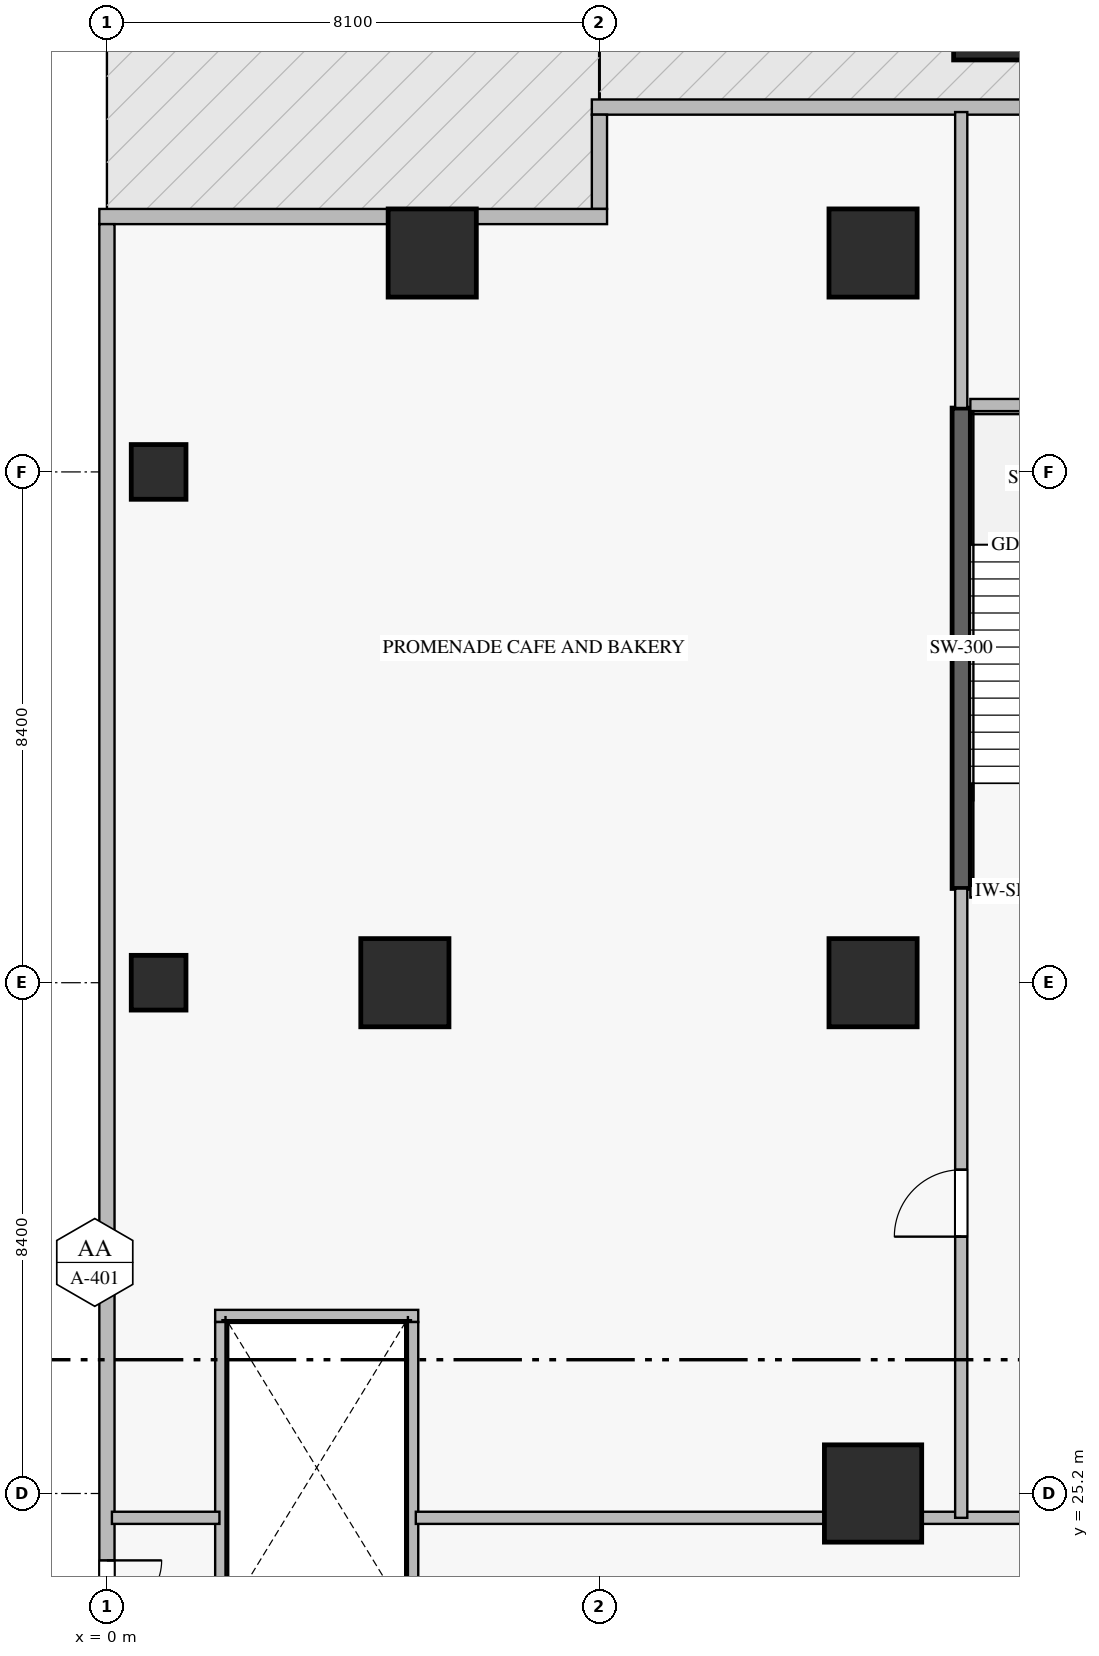
"""IFC4 building model, lengths in metres.
Left out: names, types, materials, properties, quantities, classifications, styles, units other than length and angle.
Written with IfcOpenShell. Run it as: python <this file> out.ifc"""

import sys

from ifc_helpers import new_model, si_unit, direction, frame, frame_2d, origin, origin_2d, place, context, subcontext, project, spatial, rectangle, extrude, source, transform, mapped, element, fill, save


model = new_model("IFC4")
c1 = context("Model", 3, precision=1e-05, world=origin(), true_north=direction((0.0, 1.0)))
c2 = subcontext(c1, "Body", "Model", "MODEL_VIEW")
j1 = project(units=[si_unit("LENGTHUNIT", "METRE"), si_unit("PLANEANGLEUNIT", "RADIAN")], contexts=[c1])
p1 = place(None, origin())
s1 = spatial("IfcSite", under=j1, at=p1, CompositionType="ELEMENT")
p2 = place(p1, origin())
s2 = spatial("IfcBuilding", under=s1, at=p2, CompositionType="ELEMENT")
p3 = place(p2, origin())
s3 = spatial("IfcBuildingStorey", under=s2, at=p3, CompositionType="ELEMENT", Elevation=0.0)
m1 = source(origin(), c2, "Body", "SweptSolid", [
    extrude(rectangle(XDim=0.9, YDim=0.9, at=origin_2d()), origin(), (0.0, 0.0, 1.0), 5.5),
])
for number, where, z_axis, x_axis in (
    (1, (0.85, 33.6, -0.38), (0.0, 0.0, 1.0), (1.0, 0.0, 0.0)),
    (2, (0.85, 42.0, -0.38), (0.0, 0.0, 1.0), (1.0, 0.0, 0.0)),
):
    element("IfcColumn", number, at=place(p3, frame(where, z_axis=z_axis, x_axis=x_axis)), inside=s3, PredefinedType="COLUMN", context=c2, shape_type="MappedRepresentation", body=[
        mapped(m1, transform((0.0, 0.0, 0.0), scale=1.0)),
    ])
m2 = source(origin(), c2, "Body", "SweptSolid", [
    extrude(rectangle(XDim=1.45, YDim=1.45, at=origin_2d()), origin(), (0.0, 0.0, 1.0), 5.5),
])
p4 = place(p3, frame((12.6, 45.6, -0.38), z_axis=(0.0, 0.0, 1.0), x_axis=(1.0, 0.0, 0.0)))
e3 = element("IfcColumn", 3, at=p4, inside=s3, PredefinedType="COLUMN", context=c2, shape_type="MappedRepresentation", body=[
    mapped(m2, transform((0.0, 0.0, 0.0), scale=1.0)),
])
m3 = source(origin(), c2, "Body", "SweptSolid", [
    extrude(rectangle(XDim=1.6, YDim=1.6, at=origin_2d()), origin(), (0.0, 0.0, 1.0), 5.5),
])
p5 = place(p3, frame((12.6, 25.2, -0.38), z_axis=(0.0, 0.0, 1.0), x_axis=(1.0, 0.0, 0.0)))
e4 = element("IfcColumn", 4, at=p5, inside=s3, PredefinedType="COLUMN", context=c2, shape_type="MappedRepresentation", body=[
    mapped(m3, transform((0.0, 0.0, 0.0), scale=1.0)),
])
for number, where, z_axis, x_axis in (
    (5, (12.6, 33.6, -0.38), (0.0, 0.0, 1.0), (1.0, 0.0, 0.0)),
    (6, (14.65, 49.5, -0.38), (0.0, 0.0, 1.0), (1.0, 0.0, 0.0)),
    (7, (4.9, 33.6, -0.38), (0.0, 0.0, 1.0), (1.0, 0.0, 0.0)),
    (8, (5.35, 45.6, -0.38), (0.0, 0.0, 1.0), (1.0, 0.0, 0.0)),
):
    element("IfcColumn", number, at=place(p3, frame(where, z_axis=z_axis, x_axis=x_axis)), inside=s3, PredefinedType="COLUMN", context=c2, shape_type="MappedRepresentation", body=[
        mapped(m2, transform((0.0, 0.0, 0.0), scale=1.0)),
    ])
p6 = place(p3, frame((56.825, 48.0, 0.0), z_axis=(0.0, 0.0, 1.0), x_axis=(-1.0, 0.0, 0.0)))
e9 = element("IfcWall", 9, at=p6, inside=s3, PredefinedType="ELEMENTEDWALL", context=c2, shape_type="SweptSolid", body=[
    extrude(rectangle(XDim=48.85, YDim=0.25, at=frame_2d((24.425, 0.0))), origin(), (0.0, 0.0, 1.0), 5.105),
])
p7 = place(p6, frame((7.825, 0.0, 0.0)))
e10 = element("IfcOpeningElement", 10, at=p7, cuts=e9, PredefinedType="OPENING", context=c2, shape_type="SweptSolid", body=[
    extrude(rectangle(XDim=4.2, YDim=3.1, at=frame_2d((2.1, 1.55))), frame((0.0, 0.135, 0.0), z_axis=(0.0, -1.0, 0.0), x_axis=(1.0, 0.0, 0.0)), (0.0, 0.0, 1.0), 0.27),
])
p8 = place(p6, frame((14.725, 0.0, 0.0)))
e11 = element("IfcOpeningElement", 11, at=p8, cuts=e9, PredefinedType="OPENING", context=c2, shape_type="SweptSolid", body=[
    extrude(rectangle(XDim=3.8, YDim=3.4, at=frame_2d((1.9, 1.7))), frame((0.0, 0.135, 0.0), z_axis=(0.0, -1.0, 0.0), x_axis=(1.0, 0.0, 0.0)), (0.0, 0.0, 1.0), 0.27),
])
p9 = place(p6, frame((38.825, 0.0, 0.0)))
e12 = element("IfcOpeningElement", 12, at=p9, cuts=e9, PredefinedType="OPENING", context=c2, shape_type="SweptSolid", body=[
    extrude(rectangle(XDim=1.8, YDim=2.3, at=frame_2d((0.9, 1.15))), frame((0.0, 0.135, 0.0), z_axis=(0.0, -1.0, 0.0), x_axis=(1.0, 0.0, 0.0)), (0.0, 0.0, 1.0), 0.27),
])
p10 = place(p6, frame((2.425, 0.0, 0.0)))
e13 = element("IfcOpeningElement", 13, at=p10, cuts=e9, PredefinedType="OPENING", context=c2, shape_type="SweptSolid", body=[
    extrude(rectangle(XDim=1.8, YDim=2.3, at=frame_2d((0.9, 1.15))), frame((0.0, 0.135, 0.0), z_axis=(0.0, -1.0, 0.0), x_axis=(1.0, 0.0, 0.0)), (0.0, 0.0, 1.0), 0.27),
])
p11 = place(p3, frame((8.1, 47.875, 0.0), z_axis=(0.0, 0.0, 1.0), x_axis=(0.0, -1.0, 0.0)))
e14 = element("IfcWall", 14, at=p11, inside=s3, PredefinedType="ELEMENTEDWALL", context=c2, shape_type="SweptSolid", body=[
    extrude(rectangle(XDim=1.55, YDim=0.25, at=frame_2d((0.775, 0.0))), origin(), (0.0, 0.0, 1.0), 5.105),
])
p12 = place(p3, frame((8.225, 46.2, 0.0), z_axis=(0.0, 0.0, 1.0), x_axis=(-1.0, 0.0, 0.0)))
e15 = element("IfcWall", 15, at=p12, inside=s3, PredefinedType="ELEMENTEDWALL", context=c2, shape_type="SweptSolid", body=[
    extrude(rectangle(XDim=8.35, YDim=0.25, at=frame_2d((4.175, 0.0))), origin(), (0.0, 0.0, 1.0), 5.105),
])
p13 = place(p3, frame((0.0, 46.075, 0.0), z_axis=(0.0, 0.0, 1.0), x_axis=(0.0, -1.0, 0.0)))
e16 = element("IfcWall", 16, at=p13, inside=s3, PredefinedType="ELEMENTEDWALL", context=c2, shape_type="SweptSolid", body=[
    extrude(rectangle(XDim=41.75, YDim=0.25, at=frame_2d((20.875, 0.0))), origin(), (0.0, 0.0, 1.0), 5.105),
])
p14 = place(p13, frame((21.975, 0.0, 0.0)))
e17 = element("IfcOpeningElement", 17, at=p14, cuts=e16, PredefinedType="OPENING", context=c2, shape_type="SweptSolid", body=[
    extrude(rectangle(XDim=1.8, YDim=2.3, at=frame_2d((0.9, 1.15))), frame((0.0, 0.135, 0.0), z_axis=(0.0, -1.0, 0.0), x_axis=(1.0, 0.0, 0.0)), (0.0, 0.0, 1.0), 0.27),
])
p15 = place(p13, frame((33.475, 0.0, 0.0)))
e18 = element("IfcOpeningElement", 18, at=p15, cuts=e16, PredefinedType="OPENING", context=c2, shape_type="SweptSolid", body=[
    extrude(rectangle(XDim=1.8, YDim=2.3, at=frame_2d((0.9, 1.15))), frame((0.0, 0.135, 0.0), z_axis=(0.0, -1.0, 0.0), x_axis=(1.0, 0.0, 0.0)), (0.0, 0.0, 1.0), 0.27),
])
p16 = place(p3, frame((14.05, 35.15, -0.38), z_axis=(0.0, 0.0, 1.0), x_axis=(0.0, 1.0, 0.0)))
e19 = element("IfcWall", 19, at=p16, inside=s3, PredefinedType="SHEAR", context=c2, shape_type="SweptSolid", body=[
    extrude(rectangle(XDim=7.9, YDim=0.3, at=frame_2d((3.95, 0.0))), origin(), (0.0, 0.0, 1.0), 5.498),
])
p17 = place(p3, frame((14.2, 35.1, 0.0), z_axis=(0.0, 0.0, 1.0), x_axis=(1.0, 0.0, 0.0)))
e20 = element("IfcWall", 20, at=p17, inside=s3, PredefinedType="STANDARD", context=c2, shape_type="SweptSolid", body=[
    extrude(rectangle(XDim=3.5, YDim=0.2, at=frame_2d((1.75, 0.0))), origin(), (0.0, 0.0, 1.0), 5.12),
])
p18 = place(p17, frame((1.2, 0.0, 0.0)))
e21 = element("IfcOpeningElement", 21, at=p18, cuts=e20, PredefinedType="OPENING", context=c2, shape_type="SweptSolid", body=[
    extrude(rectangle(XDim=1.1, YDim=2.15, at=frame_2d((0.55, 1.075))), frame((0.0, 0.11, 0.0), z_axis=(0.0, -1.0, 0.0), x_axis=(1.0, 0.0, 0.0)), (0.0, 0.0, 1.0), 0.22),
])
p19 = place(p3, frame((14.2, 43.1, 0.0), z_axis=(0.0, 0.0, 1.0), x_axis=(1.0, 0.0, 0.0)))
e22 = element("IfcWall", 22, at=p19, inside=s3, PredefinedType="STANDARD", context=c2, shape_type="SweptSolid", body=[
    extrude(rectangle(XDim=3.5, YDim=0.2, at=frame_2d((1.75, 0.0))), origin(), (0.0, 0.0, 1.0), 2.235),
])
p20 = place(p3, frame((1.78, 28.12, 0.0), z_axis=(0.0, 0.0, 1.0), x_axis=(1.0, 0.0, 0.0)))
e23 = element("IfcWall", 23, at=p20, inside=s3, PredefinedType="STANDARD", context=c2, shape_type="SweptSolid", body=[
    extrude(rectangle(XDim=3.34, YDim=0.2, at=frame_2d((1.67, 0.0))), origin(), (0.0, 0.0, 1.0), 5.12),
])
for number, where, z_axis, x_axis in (
    (24, (1.88, 21.78, 0.0), (0.0, 0.0, 1.0), (0.0, 1.0, 0.0)),
    (25, (5.02, 21.78, 0.0), (0.0, 0.0, 1.0), (0.0, 1.0, 0.0)),
):
    element("IfcWall", number, at=place(p3, frame(where, z_axis=z_axis, x_axis=x_axis)), inside=s3, PredefinedType="STANDARD", context=c2, shape_type="SweptSolid", body=[
        extrude(rectangle(XDim=6.24, YDim=0.2, at=frame_2d((3.12, 0.0))), origin(), (0.0, 0.0, 1.0), 5.12),
    ])
p21 = place(p3, frame((0.082, 24.8, 0.0), z_axis=(0.0, 0.0, 1.0), x_axis=(1.0, 0.0, 0.0)))
e26 = element("IfcWall", 26, at=p21, inside=s3, PredefinedType="STANDARD", context=c2, shape_type="SweptSolid", body=[
    extrude(rectangle(XDim=1.768, YDim=0.2, at=frame_2d((0.884, 0.0))), origin(), (0.0, 0.0, 1.0), 5.12),
])
p22 = place(p3, frame((5.08, 24.8, 0.0), z_axis=(0.0, 0.0, 1.0), x_axis=(1.0, 0.0, 0.0)))
e27 = element("IfcWall", 27, at=p22, inside=s3, PredefinedType="STANDARD", context=c2, shape_type="SweptSolid", body=[
    extrude(rectangle(XDim=16.42, YDim=0.2, at=frame_2d((8.21, 0.0))), origin(), (0.0, 0.0, 1.0), 5.12),
])
p23 = place(p3, frame((14.05, 24.8, 0.0), z_axis=(0.0, 0.0, 1.0), x_axis=(0.0, 1.0, 0.0)))
e28 = element("IfcWall", 28, at=p23, inside=s3, PredefinedType="STANDARD", context=c2, shape_type="SweptSolid", body=[
    extrude(rectangle(XDim=10.348, YDim=0.2, at=frame_2d((5.174, 0.0))), origin(), (0.0, 0.0, 1.0), 5.12),
])
p24 = place(p23, frame((4.624, 0.0, 0.0)))
e29 = element("IfcOpeningElement", 29, at=p24, cuts=e28, PredefinedType="OPENING", context=c2, shape_type="SweptSolid", body=[
    extrude(rectangle(XDim=1.1, YDim=2.15, at=frame_2d((0.55, 1.075))), frame((0.0, 0.11, 0.0), z_axis=(0.0, -1.0, 0.0), x_axis=(1.0, 0.0, 0.0)), (0.0, 0.0, 1.0), 0.22),
])
p25 = place(p3, frame((14.05, 43.052, 0.0), z_axis=(0.0, 0.0, 1.0), x_axis=(0.0, 1.0, 0.0)))
e30 = element("IfcWall", 30, at=p25, inside=s3, PredefinedType="STANDARD", context=c2, shape_type="SweptSolid", body=[
    extrude(rectangle(XDim=4.866, YDim=0.2, at=frame_2d((2.433, 0.0))), origin(), (0.0, 0.0, 1.0), 5.12),
])
m4 = source(origin(), c2, "Body", "SweptSolid", [
    extrude(rectangle(XDim=1.8, YDim=2.3, at=frame_2d((0.9, 1.15))), frame((0.0, 0.025, 0.0), z_axis=(0.0, -1.0, 0.0), x_axis=(1.0, 0.0, 0.0)), (0.0, 0.0, 1.0), 0.05),
])
p26 = place(p14, frame((1.8, 0.0, 0.0), z_axis=(0.0, 0.0, 1.0), x_axis=(-1.0, 0.0, 0.0)))
e31 = element("IfcDoor", 31, at=p26, inside=s3, OperationType="DOUBLE_DOOR_SINGLE_SWING", PredefinedType="DOOR", context=c2, shape_type="MappedRepresentation", body=[
    mapped(m4, transform((0.0, 0.0, 0.0), scale=1.0)),
])
fill(e17, e31)
m5 = source(origin(), c2, "Body", "SweptSolid", [
    extrude(rectangle(XDim=1.1, YDim=2.15, at=frame_2d((0.55, 1.075))), frame((0.0, 0.025, 0.0), z_axis=(0.0, -1.0, 0.0), x_axis=(1.0, 0.0, 0.0)), (0.0, 0.0, 1.0), 0.05),
])
p27 = place(p24, origin())
e32 = element("IfcDoor", 32, at=p27, inside=s3, OperationType="SINGLE_SWING_LEFT", PredefinedType="DOOR", context=c2, shape_type="MappedRepresentation", body=[
    mapped(m5, transform((0.0, 0.0, 0.0), scale=1.0)),
])
fill(e29, e32)
save(model, sys.argv[1])
